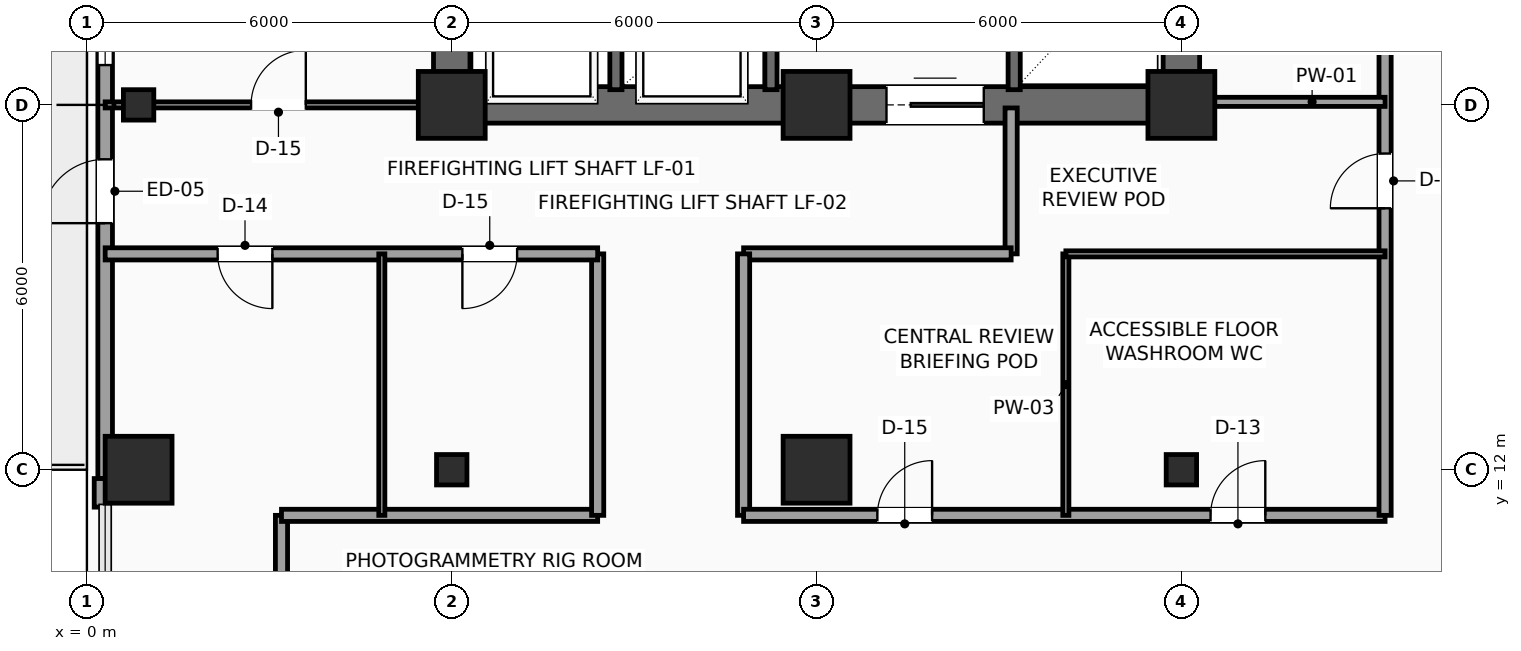
"""IFC4 building model, lengths in metres.
Left out: names, types, materials, properties, quantities, classifications, styles, units other than length and angle.
Written with IfcOpenShell. Run it as: python <this file> out.ifc"""

import sys

from ifc_helpers import new_model, si_unit, direction, frame, frame_2d, origin, origin_2d, place, context, subcontext, project, spatial, rectangle, hollow_rectangle, extrude, element, fill, save


model = new_model("IFC4")
c1 = context("Model", 3, precision=1e-05, world=origin(), true_north=direction((0.0, 1.0)))
c2 = subcontext(c1, "Body", "Model", "MODEL_VIEW")
j1 = project(units=[si_unit("LENGTHUNIT", "METRE"), si_unit("PLANEANGLEUNIT", "RADIAN")], contexts=[c1])
p1 = place(None, origin())
s1 = spatial("IfcSite", under=j1, at=p1, CompositionType="ELEMENT")
p2 = place(p1, origin())
s2 = spatial("IfcBuilding", under=s1, at=p2, CompositionType="ELEMENT")
p3 = place(p2, frame((0.0, 0.0, 141.9)))
s3 = spatial("IfcBuildingStorey", under=s2, at=p3, CompositionType="ELEMENT", Elevation=141.9)
for number, where, z_axis, x_axis in (
    (1, (6.0, 18.0, 0.0), (0.0, 0.0, 1.0), (1.0, 0.0, 0.0)),
    (2, (12.0, 18.0, 0.0), (0.0, 0.0, 1.0), (1.0, 0.0, 0.0)),
    (3, (18.0, 18.0, 0.0), (0.0, 0.0, 1.0), (1.0, 0.0, 0.0)),
    (4, (0.85, 12.0, 0.0), (0.0, 0.0, 1.0), (1.0, 0.0, 0.0)),
):
    element("IfcColumn", number, at=place(p3, frame(where, z_axis=z_axis, x_axis=x_axis)), inside=s3, PredefinedType="COLUMN", context=c2, shape_type="SweptSolid", body=[
        extrude(rectangle(XDim=1.1, YDim=1.1, at=origin_2d()), origin(), (0.0, 0.0, 1.0), 3.75),
    ])
for number, where, z_axis, x_axis in (
    (5, (0.85, 18.0, 0.0), (0.0, 0.0, 1.0), (1.0, 0.0, 0.0)),
    (6, (6.0, 12.0, 0.0), (0.0, 0.0, 1.0), (1.0, 0.0, 0.0)),
):
    element("IfcColumn", number, at=place(p3, frame(where, z_axis=z_axis, x_axis=x_axis)), inside=s3, PredefinedType="COLUMN", context=c2, shape_type="SweptSolid", body=[
        extrude(hollow_rectangle(XDim=0.5, YDim=0.5, WallThickness=0.025, InnerFilletRadius=0.025, OuterFilletRadius=0.04, at=origin_2d()), origin(), (0.0, 0.0, 1.0), 3.75),
    ])
p4 = place(p3, frame((12.0, 12.0, 0.0), z_axis=(0.0, 0.0, 1.0), x_axis=(1.0, 0.0, 0.0)))
e7 = element("IfcColumn", 7, at=p4, inside=s3, PredefinedType="COLUMN", context=c2, shape_type="SweptSolid", body=[
    extrude(rectangle(XDim=1.1, YDim=1.1, at=origin_2d()), origin(), (0.0, 0.0, 1.0), 3.75),
])
p5 = place(p3, frame((18.0, 12.0, 0.0), z_axis=(0.0, 0.0, 1.0), x_axis=(1.0, 0.0, 0.0)))
e8 = element("IfcColumn", 8, at=p5, inside=s3, PredefinedType="COLUMN", context=c2, shape_type="SweptSolid", body=[
    extrude(hollow_rectangle(XDim=0.5, YDim=0.5, WallThickness=0.025, InnerFilletRadius=0.025, OuterFilletRadius=0.04, at=origin_2d()), origin(), (0.0, 0.0, 1.0), 3.75),
])
p6 = place(p3, frame((0.3, 11.855, 0.0), z_axis=(0.0, 0.0, 1.0), x_axis=(0.0, 1.0, 0.0)))
e9 = element("IfcWall", 9, at=p6, inside=s3, PredefinedType="SOLIDWALL", context=c2, shape_type="SweptSolid", body=[
    extrude(rectangle(XDim=9.29, YDim=0.24, at=frame_2d((4.645, 0.0))), origin(), (0.0, 0.0, 1.0), 3.525),
])
p7 = place(p6, frame((4.2, 0.0, 0.0)))
e10 = element("IfcOpeningElement", 10, at=p7, cuts=e9, PredefinedType="OPENING", context=c2, shape_type="SweptSolid", body=[
    extrude(rectangle(XDim=1.05, YDim=2.2, at=frame_2d((0.525, 1.1))), frame((0.0, 0.13, 0.0), z_axis=(0.0, -1.0, 0.0), x_axis=(1.0, 0.0, 0.0)), (0.0, 0.0, 1.0), 0.26),
])
p8 = place(p6, frame((6.8, 0.0, 0.85)))
e11 = element("IfcOpeningElement", 11, at=p8, cuts=e9, PredefinedType="OPENING", context=c2, shape_type="SweptSolid", body=[
    extrude(rectangle(XDim=1.8, YDim=2.1, at=frame_2d((0.9, 1.05))), frame((0.0, 0.13, 0.0), z_axis=(0.0, -1.0, 0.0), x_axis=(1.0, 0.0, 0.0)), (0.0, 0.0, 1.0), 0.26),
])
p9 = place(p3, frame((0.24, 11.385, 0.0), z_axis=(0.0, 0.0, 1.0), x_axis=(0.0, 1.0, 0.0)))
e12 = element("IfcWall", 12, at=p9, inside=s3, PredefinedType="SOLIDWALL", context=c2, shape_type="SweptSolid", body=[
    extrude(rectangle(XDim=0.47, YDim=0.24, at=frame_2d((0.235, 0.0))), origin(), (0.0, 0.0, 1.0), 3.525),
])
p10 = place(p3, frame((6.0, 18.0, 0.0), z_axis=(0.0, 0.0, 1.0), x_axis=(1.0, 0.0, 0.0)))
e13 = element("IfcWall", 13, at=p10, inside=s3, PredefinedType="SHEAR", context=c2, shape_type="SweptSolid", body=[
    extrude(rectangle(XDim=12.0, YDim=0.6, at=frame_2d((6.0, 0.0))), origin(), (0.0, 0.0, 1.0), 3.525),
])
p11 = place(p10, frame((7.15, 0.0, 0.0)))
e14 = element("IfcOpeningElement", 14, at=p11, cuts=e13, PredefinedType="OPENING", context=c2, shape_type="SweptSolid", body=[
    extrude(rectangle(XDim=1.6, YDim=2.3, at=frame_2d((0.8, 1.15))), frame((0.0, 0.31, 0.0), z_axis=(0.0, -1.0, 0.0), x_axis=(1.0, 0.0, 0.0)), (0.0, 0.0, 1.0), 0.62),
])
for number, where, z_axis, x_axis in (
    (15, (6.0, 18.0, 0.0), (0.0, 0.0, 1.0), (0.0, 1.0, 0.0)),
    (16, (18.0, 18.0, 0.0), (0.0, 0.0, 1.0), (0.0, 1.0, 0.0)),
):
    element("IfcWall", number, at=place(p3, frame(where, z_axis=z_axis, x_axis=x_axis)), inside=s3, PredefinedType="SHEAR", context=c2, shape_type="SweptSolid", body=[
        extrude(rectangle(XDim=9.6, YDim=0.6, at=frame_2d((4.8, 0.0))), origin(), (0.0, 0.0, 1.0), 3.525),
    ])
for number, where, z_axis, x_axis in (
    (17, (8.7, 18.25, 0.0), (0.0, 0.0, 1.0), (0.0, 1.0, 0.0)),
    (18, (11.25, 18.25, 0.0), (0.0, 0.0, 1.0), (0.0, 1.0, 0.0)),
):
    element("IfcWall", number, at=place(p3, frame(where, z_axis=z_axis, x_axis=x_axis)), inside=s3, PredefinedType="SHEAR", context=c2, shape_type="SweptSolid", body=[
        extrude(rectangle(XDim=2.17, YDim=0.2, at=frame_2d((1.085, 0.0))), origin(), (0.0, 0.0, 1.0), 3.525),
    ])
p12 = place(p3, frame((15.25, 18.25, 0.0), z_axis=(0.0, 0.0, 1.0), x_axis=(0.0, 1.0, 0.0)))
e19 = element("IfcWall", 19, at=p12, inside=s3, PredefinedType="SHEAR", context=c2, shape_type="SweptSolid", body=[
    extrude(rectangle(XDim=5.2, YDim=0.2, at=frame_2d((2.6, 0.0))), origin(), (0.0, 0.0, 1.0), 3.525),
])
p13 = place(p3, frame((3.2, 9.2, 0.0), z_axis=(0.0, 0.0, 1.0), x_axis=(0.0, 1.0, 0.0)))
e20 = element("IfcWall", 20, at=p13, inside=s3, PredefinedType="PARTITIONING", context=c2, shape_type="SweptSolid", body=[
    extrude(rectangle(XDim=2.05, YDim=0.2, at=frame_2d((1.025, 0.0))), origin(), (0.0, 0.0, 1.0), 3.525),
])
p14 = place(p3, frame((3.2, 11.25, 0.0), z_axis=(0.0, 0.0, 1.0), x_axis=(1.0, 0.0, 0.0)))
e21 = element("IfcWall", 21, at=p14, inside=s3, PredefinedType="PARTITIONING", context=c2, shape_type="SweptSolid", body=[
    extrude(rectangle(XDim=5.2, YDim=0.2, at=frame_2d((2.6, 0.0))), origin(), (0.0, 0.0, 1.0), 3.525),
])
p15 = place(p3, frame((8.4, 11.25, 0.0), z_axis=(0.0, 0.0, 1.0), x_axis=(0.0, 1.0, 0.0)))
e22 = element("IfcWall", 22, at=p15, inside=s3, PredefinedType="PARTITIONING", context=c2, shape_type="SweptSolid", body=[
    extrude(rectangle(XDim=4.3, YDim=0.2, at=frame_2d((2.15, 0.0))), origin(), (0.0, 0.0, 1.0), 3.525),
])
p16 = place(p3, frame((8.4, 15.55, 0.0), z_axis=(0.0, 0.0, 1.0), x_axis=(-1.0, 0.0, 0.0)))
e23 = element("IfcWall", 23, at=p16, inside=s3, PredefinedType="PARTITIONING", context=c2, shape_type="SweptSolid", body=[
    extrude(rectangle(XDim=8.1, YDim=0.2, at=frame_2d((4.05, 0.0))), origin(), (0.0, 0.0, 1.0), 3.525),
])
p17 = place(p16, frame((5.35, 0.0, 0.0)))
e24 = element("IfcOpeningElement", 24, at=p17, cuts=e23, PredefinedType="OPENING", context=c2, shape_type="SweptSolid", body=[
    extrude(rectangle(XDim=0.9, YDim=2.1, at=frame_2d((0.45, 1.05))), frame((0.0, 0.11, 0.0), z_axis=(0.0, -1.0, 0.0), x_axis=(1.0, 0.0, 0.0)), (0.0, 0.0, 1.0), 0.22),
])
p18 = place(p16, frame((1.325, 0.0, 0.0)))
e25 = element("IfcOpeningElement", 25, at=p18, cuts=e23, PredefinedType="OPENING", context=c2, shape_type="SweptSolid", body=[
    extrude(rectangle(XDim=0.9, YDim=2.1, at=frame_2d((0.45, 1.05))), frame((0.0, 0.11, 0.0), z_axis=(0.0, -1.0, 0.0), x_axis=(1.0, 0.0, 0.0)), (0.0, 0.0, 1.0), 0.22),
])
p19 = place(p3, frame((15.2, 17.95, 0.0), z_axis=(0.0, 0.0, 1.0), x_axis=(0.0, -1.0, 0.0)))
e26 = element("IfcWall", 26, at=p19, inside=s3, PredefinedType="PARTITIONING", context=c2, shape_type="SweptSolid", body=[
    extrude(rectangle(XDim=2.4, YDim=0.2, at=frame_2d((1.2, 0.0))), origin(), (0.0, 0.0, 1.0), 3.525),
])
p20 = place(p3, frame((15.2, 15.55, 0.0), z_axis=(0.0, 0.0, 1.0), x_axis=(-1.0, 0.0, 0.0)))
e27 = element("IfcWall", 27, at=p20, inside=s3, PredefinedType="PARTITIONING", context=c2, shape_type="SweptSolid", body=[
    extrude(rectangle(XDim=4.4, YDim=0.2, at=frame_2d((2.2, 0.0))), origin(), (0.0, 0.0, 1.0), 3.525),
])
p21 = place(p3, frame((10.8, 15.55, 0.0), z_axis=(0.0, 0.0, 1.0), x_axis=(0.0, -1.0, 0.0)))
e28 = element("IfcWall", 28, at=p21, inside=s3, PredefinedType="PARTITIONING", context=c2, shape_type="SweptSolid", body=[
    extrude(rectangle(XDim=4.3, YDim=0.2, at=frame_2d((2.15, 0.0))), origin(), (0.0, 0.0, 1.0), 3.525),
])
p22 = place(p3, frame((10.8, 11.25, 0.0), z_axis=(0.0, 0.0, 1.0), x_axis=(1.0, 0.0, 0.0)))
e29 = element("IfcWall", 29, at=p22, inside=s3, PredefinedType="PARTITIONING", context=c2, shape_type="SweptSolid", body=[
    extrude(rectangle(XDim=10.55, YDim=0.2, at=frame_2d((5.275, 0.0))), origin(), (0.0, 0.0, 1.0), 3.525),
])
p23 = place(p22, frame((2.2, 0.0, 0.0)))
e30 = element("IfcOpeningElement", 30, at=p23, cuts=e29, PredefinedType="OPENING", context=c2, shape_type="SweptSolid", body=[
    extrude(rectangle(XDim=0.9, YDim=2.1, at=frame_2d((0.45, 1.05))), frame((0.0, 0.11, 0.0), z_axis=(0.0, -1.0, 0.0), x_axis=(1.0, 0.0, 0.0)), (0.0, 0.0, 1.0), 0.22),
])
p24 = place(p22, frame((7.68, 0.0, 0.0)))
e31 = element("IfcOpeningElement", 31, at=p24, cuts=e29, PredefinedType="OPENING", context=c2, shape_type="SweptSolid", body=[
    extrude(rectangle(XDim=0.9, YDim=2.1, at=frame_2d((0.45, 1.05))), frame((0.0, 0.11, 0.0), z_axis=(0.0, -1.0, 0.0), x_axis=(1.0, 0.0, 0.0)), (0.0, 0.0, 1.0), 0.22),
])
p25 = place(p3, frame((21.35, 11.25, 0.0), z_axis=(0.0, 0.0, 1.0), x_axis=(0.0, 1.0, 0.0)))
e32 = element("IfcWall", 32, at=p25, inside=s3, PredefinedType="PARTITIONING", context=c2, shape_type="SweptSolid", body=[
    extrude(rectangle(XDim=19.0, YDim=0.2, at=frame_2d((9.5, 0.0))), origin(), (0.0, 0.0, 1.0), 3.525),
])
p26 = place(p25, frame((8.7, 0.0, 0.0)))
e33 = element("IfcOpeningElement", 33, at=p26, cuts=e32, PredefinedType="OPENING", context=c2, shape_type="SweptSolid", body=[
    extrude(rectangle(XDim=0.95, YDim=2.15, at=frame_2d((0.475, 1.075))), frame((0.0, 0.11, 0.0), z_axis=(0.0, -1.0, 0.0), x_axis=(1.0, 0.0, 0.0)), (0.0, 0.0, 1.0), 0.22),
])
p27 = place(p25, frame((13.475, 0.0, 0.0)))
e34 = element("IfcOpeningElement", 34, at=p27, cuts=e32, PredefinedType="OPENING", context=c2, shape_type="SweptSolid", body=[
    extrude(rectangle(XDim=0.9, YDim=2.1, at=frame_2d((0.45, 1.05))), frame((0.0, 0.11, 0.0), z_axis=(0.0, -1.0, 0.0), x_axis=(1.0, 0.0, 0.0)), (0.0, 0.0, 1.0), 0.22),
])
p28 = place(p25, frame((5.05, 0.0, 0.0)))
e35 = element("IfcOpeningElement", 35, at=p28, cuts=e32, PredefinedType="OPENING", context=c2, shape_type="SweptSolid", body=[
    extrude(rectangle(XDim=0.9, YDim=2.1, at=frame_2d((0.45, 1.05))), frame((0.0, 0.11, 0.0), z_axis=(0.0, -1.0, 0.0), x_axis=(1.0, 0.0, 0.0)), (0.0, 0.0, 1.0), 0.22),
])
p29 = place(p3, frame((16.1, 11.25, 0.0), z_axis=(0.0, 0.0, 1.0), x_axis=(0.0, 1.0, 0.0)))
e36 = element("IfcWall", 36, at=p29, inside=s3, PredefinedType="PARTITIONING", context=c2, shape_type="SweptSolid", body=[
    extrude(rectangle(XDim=4.3, YDim=0.1, at=frame_2d((2.15, 0.0))), origin(), (0.0, 0.0, 1.0), 3.525),
])
p30 = place(p3, frame((16.1, 15.55, 0.0), z_axis=(0.0, 0.0, 1.0), x_axis=(1.0, 0.0, 0.0)))
e37 = element("IfcWall", 37, at=p30, inside=s3, PredefinedType="PARTITIONING", context=c2, shape_type="SweptSolid", body=[
    extrude(rectangle(XDim=5.25, YDim=0.1, at=frame_2d((2.625, 0.0))), origin(), (0.0, 0.0, 1.0), 3.525),
])
p31 = place(p3, frame((18.1, 18.05, 0.0), z_axis=(0.0, 0.0, 1.0), x_axis=(1.0, 0.0, 0.0)))
e38 = element("IfcWall", 38, at=p31, inside=s3, PredefinedType="PARTITIONING", context=c2, shape_type="SweptSolid", body=[
    extrude(rectangle(XDim=3.25, YDim=0.15, at=frame_2d((1.625, 0.0))), origin(), (0.0, 0.0, 1.0), 3.017),
])
p32 = place(p3, frame((0.3, 18.0, 0.0), z_axis=(0.0, 0.0, 1.0), x_axis=(1.0, 0.0, 0.0)))
e39 = element("IfcWall", 39, at=p32, inside=s3, PredefinedType="PARTITIONING", context=c2, shape_type="SweptSolid", body=[
    extrude(rectangle(XDim=5.65, YDim=0.1, at=frame_2d((2.825, 0.0))), origin(), (0.0, 0.0, 1.0), 3.017),
])
p33 = place(p32, frame((2.4, 0.0, 0.0)))
e40 = element("IfcOpeningElement", 40, at=p33, cuts=e39, PredefinedType="OPENING", context=c2, shape_type="SweptSolid", body=[
    extrude(rectangle(XDim=0.9, YDim=2.1, at=frame_2d((0.45, 1.05))), frame((0.0, 0.06, 0.0), z_axis=(0.0, -1.0, 0.0), x_axis=(1.0, 0.0, 0.0)), (0.0, 0.0, 1.0), 0.12),
])
p34 = place(p3, frame((4.85, 11.25, 0.0), z_axis=(0.0, 0.0, 1.0), x_axis=(0.0, 1.0, 0.0)))
e41 = element("IfcWall", 41, at=p34, inside=s3, PredefinedType="PARTITIONING", context=c2, shape_type="SweptSolid", body=[
    extrude(rectangle(XDim=4.3, YDim=0.1, at=frame_2d((2.15, 0.0))), origin(), (0.0, 0.0, 1.0), 3.525),
])
p35 = place(p7, origin())
e42 = element("IfcDoor", 42, at=p35, inside=s3, OperationType="SINGLE_SWING_LEFT", PredefinedType="DOOR", context=c2, shape_type="SweptSolid", body=[
    extrude(rectangle(XDim=1.05, YDim=2.2, at=frame_2d((0.525, 1.1))), frame((0.0, 0.025, 0.0), z_axis=(0.0, -1.0, 0.0), x_axis=(1.0, 0.0, 0.0)), (0.0, 0.0, 1.0), 0.05),
])
fill(e10, e42)
p36 = place(p8, origin())
e43 = element("IfcWindow", 43, at=p36, inside=s3, PartitioningType="SINGLE_PANEL", PredefinedType="WINDOW", context=c2, shape_type="SweptSolid", body=[
    extrude(rectangle(XDim=1.8, YDim=2.1, at=frame_2d((0.9, 1.05))), frame((0.0, 0.03, 0.0), z_axis=(0.0, -1.0, 0.0), x_axis=(1.0, 0.0, 0.0)), (0.0, 0.0, 1.0), 0.06),
])
fill(e11, e43)
p37 = place(p11, origin())
e44 = element("IfcDoor", 44, at=p37, inside=s3, OperationType="DOUBLE_DOOR_SLIDING", PredefinedType="DOOR", context=c2, shape_type="SweptSolid", body=[
    extrude(rectangle(XDim=1.6, YDim=2.3, at=frame_2d((0.8, 1.15))), frame((0.0, 0.025, 0.0), z_axis=(0.0, -1.0, 0.0), x_axis=(1.0, 0.0, 0.0)), (0.0, 0.0, 1.0), 0.05),
])
fill(e14, e44)
p38 = place(p17, origin())
e45 = element("IfcDoor", 45, at=p38, inside=s3, OperationType="SINGLE_SWING_LEFT", PredefinedType="DOOR", context=c2, shape_type="SweptSolid", body=[
    extrude(rectangle(XDim=0.9, YDim=2.1, at=frame_2d((0.45, 1.05))), frame((0.0, 0.025, 0.0), z_axis=(0.0, -1.0, 0.0), x_axis=(1.0, 0.0, 0.0)), (0.0, 0.0, 1.0), 0.05),
])
fill(e24, e45)
p39 = place(p18, origin())
e46 = element("IfcDoor", 46, at=p39, inside=s3, OperationType="SINGLE_SWING_RIGHT", PredefinedType="DOOR", context=c2, shape_type="SweptSolid", body=[
    extrude(rectangle(XDim=0.9, YDim=2.1, at=frame_2d((0.45, 1.05))), frame((0.0, 0.025, 0.0), z_axis=(0.0, -1.0, 0.0), x_axis=(1.0, 0.0, 0.0)), (0.0, 0.0, 1.0), 0.05),
])
fill(e25, e46)
p40 = place(p23, origin())
e47 = element("IfcDoor", 47, at=p40, inside=s3, OperationType="SINGLE_SWING_RIGHT", PredefinedType="DOOR", context=c2, shape_type="SweptSolid", body=[
    extrude(rectangle(XDim=0.9, YDim=2.1, at=frame_2d((0.45, 1.05))), frame((0.0, 0.025, 0.0), z_axis=(0.0, -1.0, 0.0), x_axis=(1.0, 0.0, 0.0)), (0.0, 0.0, 1.0), 0.05),
])
fill(e30, e47)
p41 = place(p24, origin())
e48 = element("IfcDoor", 48, at=p41, inside=s3, OperationType="SINGLE_SWING_RIGHT", PredefinedType="DOOR", context=c2, shape_type="SweptSolid", body=[
    extrude(rectangle(XDim=0.9, YDim=2.1, at=frame_2d((0.45, 1.05))), frame((0.0, 0.025, 0.0), z_axis=(0.0, -1.0, 0.0), x_axis=(1.0, 0.0, 0.0)), (0.0, 0.0, 1.0), 0.05),
])
fill(e31, e48)
p42 = place(p28, origin())
e49 = element("IfcDoor", 49, at=p42, inside=s3, OperationType="SINGLE_SWING_LEFT", PredefinedType="DOOR", context=c2, shape_type="SweptSolid", body=[
    extrude(rectangle(XDim=0.9, YDim=2.1, at=frame_2d((0.45, 1.05))), frame((0.0, 0.025, 0.0), z_axis=(0.0, -1.0, 0.0), x_axis=(1.0, 0.0, 0.0)), (0.0, 0.0, 1.0), 0.05),
])
fill(e35, e49)
p43 = place(p33, origin())
e50 = element("IfcDoor", 50, at=p43, inside=s3, OperationType="SINGLE_SWING_RIGHT", PredefinedType="DOOR", context=c2, shape_type="SweptSolid", body=[
    extrude(rectangle(XDim=0.9, YDim=2.1, at=frame_2d((0.45, 1.05))), frame((0.0, 0.025, 0.0), z_axis=(0.0, -1.0, 0.0), x_axis=(1.0, 0.0, 0.0)), (0.0, 0.0, 1.0), 0.05),
])
fill(e40, e50)
save(model, sys.argv[1])
